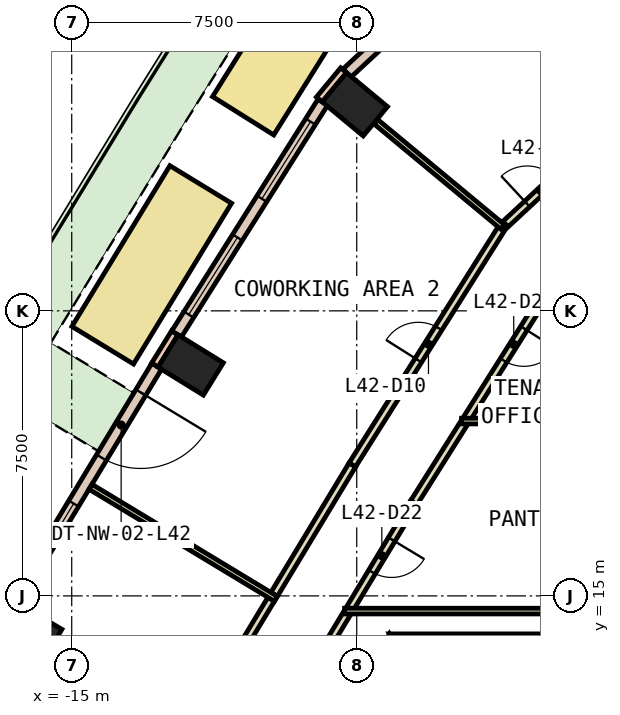
"""IFC4 building model, lengths in metres.
Left out: names, types, materials, properties, quantities, classifications, styles, units other than length and angle.
Written with IfcOpenShell. Run it as: python <this file> out.ifc"""

import sys

from ifc_helpers import new_model, si_unit, direction, frame, frame_2d, origin, origin_2d, place, context, subcontext, project, spatial, polyline, rectangle, outline, extrude, element, fill, save


model = new_model("IFC4")
c1 = context("Model", 3, precision=1e-05, world=origin(), true_north=direction((0.0, 1.0)))
c2 = subcontext(c1, "Body", "Model", "MODEL_VIEW")
j1 = project(units=[si_unit("LENGTHUNIT", "METRE"), si_unit("PLANEANGLEUNIT", "RADIAN")], contexts=[c1])
p1 = place(None, origin())
s1 = spatial("IfcSite", under=j1, at=p1, CompositionType="ELEMENT")
p2 = place(p1, origin())
s2 = spatial("IfcBuilding", under=s1, at=p2, CompositionType="ELEMENT")
p3 = place(p2, frame((0.0, 0.0, 189.8)))
s3 = spatial("IfcBuildingStorey", under=s2, at=p3, CompositionType="ELEMENT", Elevation=189.8)
for number, where, z_axis, x_axis in (
    (1, (-7.549, 27.935, 0.0), (0.0, 0.0, 1.0), (0.639, 0.769, 0.0)),
    (2, (-11.869, 21.076, 0.0), (0.0, 0.0, 1.0), (0.525, 0.851, 0.0)),
    (3, (-16.116, 14.046, 0.0), (0.0, 0.0, 1.0), (0.509, 0.861, 0.0)),
):
    element("IfcColumn", number, at=place(p3, frame(where, z_axis=z_axis, x_axis=x_axis)), inside=s3, PredefinedType="COLUMN", context=c2, shape_type="SweptSolid", body=[
        extrude(rectangle(XDim=1.0, YDim=1.4, at=origin_2d()), origin(), (0.0, 0.0, 1.0), 3.8),
    ])
p4 = place(p3, frame((0.0, 0.0, -0.6)))
e4 = element("IfcWall", 4, at=p4, inside=s3, PredefinedType="SHEAR", context=c2, shape_type="SweptSolid", body=[
    extrude(outline(polyline([(6.64, 14.0), (-6.64, 14.0), (-6.235, 13.3), (6.235, 13.3), (6.64, 14.0)])), origin(), (0.0, 0.0, 1.0), 4.4),
])
p5 = place(p3, frame((0.0, 0.0, -0.6)))
e5 = element("IfcWall", 5, at=p5, inside=s3, PredefinedType="SHEAR", context=c2, shape_type="SweptSolid", body=[
    extrude(outline(polyline([(-11.834, 5.002), (-11.228, 4.652), (-6.235, 13.3), (-6.64, 14.0), (-11.834, 5.002)])), origin(), (0.0, 0.0, 1.0), 4.4),
])
p6 = place(p3, frame((-7.846, 28.831, 0.0), z_axis=(0.0, 0.0, 1.0), x_axis=(-0.637972365578, -0.770059257953, 0.0)))
e6 = element("IfcWall", 6, at=p6, inside=s3, PredefinedType="STANDARD", context=c2, shape_type="SweptSolid", body=[
    extrude(rectangle(XDim=1.0, YDim=0.2, at=frame_2d((0.5, 0.0))), origin(), (0.0, 0.0, 1.0), 3.8),
])
p7 = place(p3, frame((-12.287, 21.922, 0.0), z_axis=(0.0, 0.0, 1.0), x_axis=(-0.525648735675, -0.850701714282, 0.0)))
e7 = element("IfcWall", 7, at=p7, inside=s3, PredefinedType="STANDARD", context=c2, shape_type="SweptSolid", body=[
    extrude(rectangle(XDim=1.0, YDim=0.2, at=frame_2d((0.5, 0.0))), origin(), (0.0, 0.0, 1.0), 3.8),
])
p8 = place(p3, frame((-4.996, 31.319, 0.0), z_axis=(0.0, 0.0, 1.0), x_axis=(-0.732897351132, -0.680339233547, 0.0)))
e8 = element("IfcWall", 8, at=p8, inside=s3, PredefinedType="STANDARD", context=c2, shape_type="SweptSolid", body=[
    extrude(rectangle(XDim=3.767, YDim=0.3, at=frame_2d((1.884, 0.0))), origin(), (0.0, 0.0, 1.0), 3.8),
])
p9 = place(p8, frame((1.184, 0.0, 0.9)))
e9 = element("IfcOpeningElement", 9, at=p9, cuts=e8, PredefinedType="OPENING", context=c2, shape_type="SweptSolid", body=[
    extrude(rectangle(XDim=1.4, YDim=2.6, at=frame_2d((0.7, 1.3))), frame((0.0, 0.16, 0.0), z_axis=(0.0, -1.0, 0.0), x_axis=(1.0, 0.0, 0.0)), (0.0, 0.0, 1.0), 0.32),
])
p10 = place(p3, frame((-8.394, 27.988, 0.0), z_axis=(0.0, 0.0, 1.0), x_axis=(-0.533680752529, -0.845686025887, 0.0)))
e10 = element("IfcWall", 10, at=p10, inside=s3, PredefinedType="STANDARD", context=c2, shape_type="SweptSolid", body=[
    extrude(rectangle(XDim=7.208, YDim=0.3, at=frame_2d((3.604, 0.0))), origin(), (0.0, 0.0, 1.0), 3.8),
])
p11 = place(p10, frame((0.602, 0.0, 0.9)))
e11 = element("IfcOpeningElement", 11, at=p11, cuts=e10, PredefinedType="OPENING", context=c2, shape_type="SweptSolid", body=[
    extrude(rectangle(XDim=2.4, YDim=2.6, at=frame_2d((1.2, 1.3))), frame((0.0, 0.16, 0.0), z_axis=(0.0, -1.0, 0.0), x_axis=(1.0, 0.0, 0.0)), (0.0, 0.0, 1.0), 0.32),
])
p12 = place(p10, frame((4.206, 0.0, 0.9)))
e12 = element("IfcOpeningElement", 12, at=p12, cuts=e10, PredefinedType="OPENING", context=c2, shape_type="SweptSolid", body=[
    extrude(rectangle(XDim=2.4, YDim=2.6, at=frame_2d((1.2, 1.3))), frame((0.0, 0.16, 0.0), z_axis=(0.0, -1.0, 0.0), x_axis=(1.0, 0.0, 0.0)), (0.0, 0.0, 1.0), 0.32),
])
p13 = place(p3, frame((-12.765, 21.043, 0.0), z_axis=(0.0, 0.0, 1.0), x_axis=(-0.517159962006, -0.855888762456, 0.0)))
e13 = element("IfcWall", 13, at=p13, inside=s3, PredefinedType="STANDARD", context=c2, shape_type="SweptSolid", body=[
    extrude(rectangle(XDim=7.23, YDim=0.3, at=frame_2d((3.615, 0.0))), origin(), (0.0, 0.0, 1.0), 3.8),
])
p14 = place(p13, frame((0.807, 0.0, 0.0)))
e14 = element("IfcOpeningElement", 14, at=p14, cuts=e13, PredefinedType="OPENING", context=c2, shape_type="SweptSolid", body=[
    extrude(rectangle(XDim=2.0, YDim=2.4, at=frame_2d((1.0, 1.2))), frame((0.0, 0.16, 0.0), z_axis=(0.0, -1.0, 0.0), x_axis=(1.0, 0.0, 0.0)), (0.0, 0.0, 1.0), 0.32),
])
p15 = place(p13, frame((4.222, 0.0, 0.9)))
e15 = element("IfcOpeningElement", 15, at=p15, cuts=e13, PredefinedType="OPENING", context=c2, shape_type="SweptSolid", body=[
    extrude(rectangle(XDim=2.4, YDim=2.6, at=frame_2d((1.2, 1.3))), frame((0.0, 0.16, 0.0), z_axis=(0.0, -1.0, 0.0), x_axis=(1.0, 0.0, 0.0)), (0.0, 0.0, 1.0), 0.32),
])
p16 = place(p3, frame((-7.774, 31.967, 0.0), z_axis=(0.0, 0.0, 1.0), x_axis=(-0.530891180882, -0.847440000272, 0.0)))
e16 = element("IfcWall", 16, at=p16, inside=s3, PredefinedType="STANDARD", context=c2, shape_type="SweptSolid", body=[
    extrude(rectangle(XDim=5.114, YDim=1.9, at=frame_2d((2.557, 0.0))), origin(), (0.0, 0.0, 1.0), 0.8),
])
p17 = place(p3, frame((-11.606, 25.825, 0.0), z_axis=(0.0, 0.0, 1.0), x_axis=(-0.520440925316, -0.853897677275, 0.0)))
e17 = element("IfcWall", 17, at=p17, inside=s3, PredefinedType="STANDARD", context=c2, shape_type="SweptSolid", body=[
    extrude(rectangle(XDim=4.954, YDim=1.9, at=frame_2d((2.477, 0.0))), origin(), (0.0, 0.0, 1.0), 0.8),
])
p18 = place(p3, frame((-7.759, 14.536, 0.0), z_axis=(0.0, 0.0, 1.0), x_axis=(-0.516926279395, -0.856029918678, 0.0)))
e18 = element("IfcWall", 18, at=p18, inside=s3, PredefinedType="PARTITIONING", context=c2, shape_type="SweptSolid", body=[
    extrude(rectangle(XDim=3.188, YDim=0.2, at=frame_2d((1.594, 0.0))), origin(), (0.0, 0.0, 1.0), 3.8),
])
p19 = place(p18, frame((1.094, 0.0, 0.0)))
e19 = element("IfcOpeningElement", 19, at=p19, cuts=e18, PredefinedType="OPENING", context=c2, shape_type="SweptSolid", body=[
    extrude(rectangle(XDim=1.0, YDim=2.1, at=frame_2d((0.5, 1.05))), frame((0.0, 0.11, 0.0), z_axis=(0.0, -1.0, 0.0), x_axis=(1.0, 0.0, 0.0)), (0.0, 0.0, 1.0), 0.22),
])
p20 = place(p3, frame((-4.682, 19.537, 0.0), z_axis=(0.0, 0.0, 1.0), x_axis=(-0.533579580306, -0.845749863423, 0.0)))
e20 = element("IfcWall", 20, at=p20, inside=s3, PredefinedType="PARTITIONING", context=c2, shape_type="SweptSolid", body=[
    extrude(rectangle(XDim=2.467, YDim=0.2, at=frame_2d((1.233, 0.0))), origin(), (0.0, 0.0, 1.0), 3.8),
])
p21 = place(p3, frame((-5.998, 17.451, 0.0), z_axis=(0.0, 0.0, 1.0), x_axis=(-0.516919907997, -0.856033766108, 0.0)))
e21 = element("IfcWall", 21, at=p21, inside=s3, PredefinedType="PARTITIONING", context=c2, shape_type="SweptSolid", body=[
    extrude(rectangle(XDim=3.256, YDim=0.2, at=frame_2d((1.628, 0.0))), origin(), (0.0, 0.0, 1.0), 3.8),
])
p22 = place(p21, frame((1.128, 0.0, 0.0)))
e22 = element("IfcOpeningElement", 22, at=p22, cuts=e21, PredefinedType="OPENING", context=c2, shape_type="SweptSolid", body=[
    extrude(rectangle(XDim=1.0, YDim=2.1, at=frame_2d((0.5, 1.05))), frame((0.0, 0.11, 0.0), z_axis=(0.0, -1.0, 0.0), x_axis=(1.0, 0.0, 0.0)), (0.0, 0.0, 1.0), 0.22),
])
p23 = place(p3, frame((-2.136, 23.571, 0.0), z_axis=(0.0, 0.0, 1.0), x_axis=(-0.533664968846, -0.845695986171, 0.0)))
e23 = element("IfcWall", 23, at=p23, inside=s3, PredefinedType="PARTITIONING", context=c2, shape_type="SweptSolid", body=[
    extrude(rectangle(XDim=4.621, YDim=0.2, at=frame_2d((2.311, 0.0))), origin(), (0.0, 0.0, 1.0), 3.8),
])
p24 = place(p23, frame((1.81, 0.0, 0.0)))
e24 = element("IfcOpeningElement", 24, at=p24, cuts=e23, PredefinedType="OPENING", context=c2, shape_type="SweptSolid", body=[
    extrude(rectangle(XDim=1.0, YDim=2.1, at=frame_2d((0.5, 1.05))), frame((0.0, 0.11, 0.0), z_axis=(0.0, -1.0, 0.0), x_axis=(1.0, 0.0, 0.0)), (0.0, 0.0, 1.0), 0.22),
])
p25 = place(p3, frame((-3.59, 24.778, 0.0), z_axis=(0.0, 0.0, 1.0), x_axis=(0.732939008525, 0.680294355248, 0.0)))
e25 = element("IfcWall", 25, at=p25, inside=s3, PredefinedType="PARTITIONING", context=c2, shape_type="SweptSolid", body=[
    extrude(rectangle(XDim=2.569, YDim=0.2, at=frame_2d((1.285, 0.0))), origin(), (0.0, 0.0, 1.0), 3.8),
])
p26 = place(p25, frame((0.785, 0.0, 0.0)))
e26 = element("IfcOpeningElement", 26, at=p26, cuts=e25, PredefinedType="OPENING", context=c2, shape_type="SweptSolid", body=[
    extrude(rectangle(XDim=1.0, YDim=2.1, at=frame_2d((0.5, 1.05))), frame((0.0, 0.11, 0.0), z_axis=(0.0, -1.0, 0.0), x_axis=(1.0, 0.0, 0.0)), (0.0, 0.0, 1.0), 0.22),
])
p27 = place(p3, frame((-9.674, 15.039, 0.0), z_axis=(0.0, 0.0, 1.0), x_axis=(0.516918251554, 0.856034766356, 0.0)))
e27 = element("IfcWall", 27, at=p27, inside=s3, PredefinedType="PARTITIONING", context=c2, shape_type="SweptSolid", body=[
    extrude(rectangle(XDim=3.983, YDim=0.2, at=frame_2d((1.992, 0.0))), origin(), (0.0, 0.0, 1.0), 3.8),
])
p28 = place(p3, frame((-7.615, 18.449, 0.0), z_axis=(0.0, 0.0, 1.0), x_axis=(0.533699180497, 0.845674396406, 0.0)))
e28 = element("IfcWall", 28, at=p28, inside=s3, PredefinedType="PARTITIONING", context=c2, shape_type="SweptSolid", body=[
    extrude(rectangle(XDim=7.504, YDim=0.2, at=frame_2d((3.752, 0.0))), origin(), (0.0, 0.0, 1.0), 3.8),
])
p29 = place(p28, frame((3.252, 0.0, 0.0)))
e29 = element("IfcOpeningElement", 29, at=p29, cuts=e28, PredefinedType="OPENING", context=c2, shape_type="SweptSolid", body=[
    extrude(rectangle(XDim=1.0, YDim=2.1, at=frame_2d((0.5, 1.05))), frame((0.0, 0.11, 0.0), z_axis=(0.0, -1.0, 0.0), x_axis=(1.0, 0.0, 0.0)), (0.0, 0.0, 1.0), 0.22),
])
p30 = place(p3, frame((-11.811, 11.503, 0.0), z_axis=(0.0, 0.0, 1.0), x_axis=(0.517135291957, 0.855903668535, 0.0)))
e30 = element("IfcWall", 30, at=p30, inside=s3, PredefinedType="PARTITIONING", context=c2, shape_type="SweptSolid", body=[
    extrude(rectangle(XDim=3.982, YDim=0.2, at=frame_2d((1.991, 0.0))), origin(), (0.0, 0.0, 1.0), 3.8),
])
p31 = place(p3, frame((-0.4, 14.6, 0.0), z_axis=(0.0, 0.0, 1.0), x_axis=(-1.0, 0.0, 0.0)))
e31 = element("IfcWall", 31, at=p31, inside=s3, PredefinedType="PARTITIONING", context=c2, shape_type="SweptSolid", body=[
    extrude(rectangle(XDim=7.42, YDim=0.15, at=frame_2d((3.71, 0.0))), origin(), (0.0, 0.0, 1.0), 3.8),
])
p32 = place(p3, frame((-4.742, 19.6, 0.0), z_axis=(0.0, 0.0, 1.0), x_axis=(1.0, 0.0, 0.0)))
e32 = element("IfcWall", 32, at=p32, inside=s3, PredefinedType="PARTITIONING", context=c2, shape_type="SweptSolid", body=[
    extrude(rectangle(XDim=4.342, YDim=0.15, at=frame_2d((2.171, 0.0))), origin(), (0.0, 0.0, 1.0), 3.8),
])
p33 = place(p3, frame((-3.663, 24.71, 0.0), z_axis=(0.0, 0.0, 1.0), x_axis=(-0.76953221629, 0.638607992505, 0.0)))
e33 = element("IfcWall", 33, at=p33, inside=s3, PredefinedType="PARTITIONING", context=c2, shape_type="SweptSolid", body=[
    extrude(rectangle(XDim=4.33, YDim=0.15, at=frame_2d((2.165, 0.0))), origin(), (0.0, 0.0, 1.0), 3.8),
])
p34 = place(p3, frame((-9.628, 14.924, 0.0), z_axis=(0.0, 0.0, 1.0), x_axis=(-0.855931736607, 0.517088834021, 0.0)))
e34 = element("IfcWall", 34, at=p34, inside=s3, PredefinedType="PARTITIONING", context=c2, shape_type="SweptSolid", body=[
    extrude(rectangle(XDim=5.699, YDim=0.15, at=frame_2d((2.85, 0.0))), origin(), (0.0, 0.0, 1.0), 3.8),
])
p35 = place(p11, origin())
e35 = element("IfcWindow", 35, at=p35, inside=s3, PartitioningType="SINGLE_PANEL", PredefinedType="WINDOW", context=c2, shape_type="SweptSolid", body=[
    extrude(rectangle(XDim=2.4, YDim=2.6, at=frame_2d((1.2, 1.3))), frame((0.0, 0.03, 0.0), z_axis=(0.0, -1.0, 0.0), x_axis=(1.0, 0.0, 0.0)), (0.0, 0.0, 1.0), 0.06),
])
fill(e11, e35)
p36 = place(p12, origin())
e36 = element("IfcWindow", 36, at=p36, inside=s3, PartitioningType="SINGLE_PANEL", PredefinedType="WINDOW", context=c2, shape_type="SweptSolid", body=[
    extrude(rectangle(XDim=2.4, YDim=2.6, at=frame_2d((1.2, 1.3))), frame((0.0, 0.03, 0.0), z_axis=(0.0, -1.0, 0.0), x_axis=(1.0, 0.0, 0.0)), (0.0, 0.0, 1.0), 0.06),
])
fill(e12, e36)
p37 = place(p14, origin())
e37 = element("IfcDoor", 37, at=p37, inside=s3, OperationType="SLIDING_TO_LEFT", PredefinedType="DOOR", context=c2, shape_type="SweptSolid", body=[
    extrude(rectangle(XDim=2.0, YDim=2.4, at=frame_2d((1.0, 1.2))), frame((0.0, 0.025, 0.0), z_axis=(0.0, -1.0, 0.0), x_axis=(1.0, 0.0, 0.0)), (0.0, 0.0, 1.0), 0.05),
])
fill(e14, e37)
p38 = place(p15, origin())
e38 = element("IfcWindow", 38, at=p38, inside=s3, PartitioningType="SINGLE_PANEL", PredefinedType="WINDOW", context=c2, shape_type="SweptSolid", body=[
    extrude(rectangle(XDim=2.4, YDim=2.6, at=frame_2d((1.2, 1.3))), frame((0.0, 0.03, 0.0), z_axis=(0.0, -1.0, 0.0), x_axis=(1.0, 0.0, 0.0)), (0.0, 0.0, 1.0), 0.06),
])
fill(e15, e38)
p39 = place(p26, origin())
e39 = element("IfcDoor", 39, at=p39, inside=s3, OperationType="SINGLE_SWING_LEFT", PredefinedType="DOOR", context=c2, shape_type="SweptSolid", body=[
    extrude(rectangle(XDim=1.0, YDim=2.1, at=frame_2d((0.5, 1.05))), frame((0.0, 0.025, 0.0), z_axis=(0.0, -1.0, 0.0), x_axis=(1.0, 0.0, 0.0)), (0.0, 0.0, 1.0), 0.05),
])
fill(e26, e39)
p40 = place(p29, origin())
e40 = element("IfcDoor", 40, at=p40, inside=s3, OperationType="SINGLE_SWING_RIGHT", PredefinedType="DOOR", context=c2, shape_type="SweptSolid", body=[
    extrude(rectangle(XDim=1.0, YDim=2.1, at=frame_2d((0.5, 1.05))), frame((0.0, 0.025, 0.0), z_axis=(0.0, -1.0, 0.0), x_axis=(1.0, 0.0, 0.0)), (0.0, 0.0, 1.0), 0.05),
])
fill(e29, e40)
p41 = place(p22, origin())
e41 = element("IfcDoor", 41, at=p41, inside=s3, OperationType="SINGLE_SWING_RIGHT", PredefinedType="DOOR", context=c2, shape_type="SweptSolid", body=[
    extrude(rectangle(XDim=1.0, YDim=2.1, at=frame_2d((0.5, 1.05))), frame((0.0, 0.025, 0.0), z_axis=(0.0, -1.0, 0.0), x_axis=(1.0, 0.0, 0.0)), (0.0, 0.0, 1.0), 0.05),
])
fill(e22, e41)
p42 = place(p24, origin())
e42 = element("IfcDoor", 42, at=p42, inside=s3, OperationType="SINGLE_SWING_LEFT", PredefinedType="DOOR", context=c2, shape_type="SweptSolid", body=[
    extrude(rectangle(XDim=1.0, YDim=2.1, at=frame_2d((0.5, 1.05))), frame((0.0, 0.025, 0.0), z_axis=(0.0, -1.0, 0.0), x_axis=(1.0, 0.0, 0.0)), (0.0, 0.0, 1.0), 0.05),
])
fill(e24, e42)
save(model, sys.argv[1])
